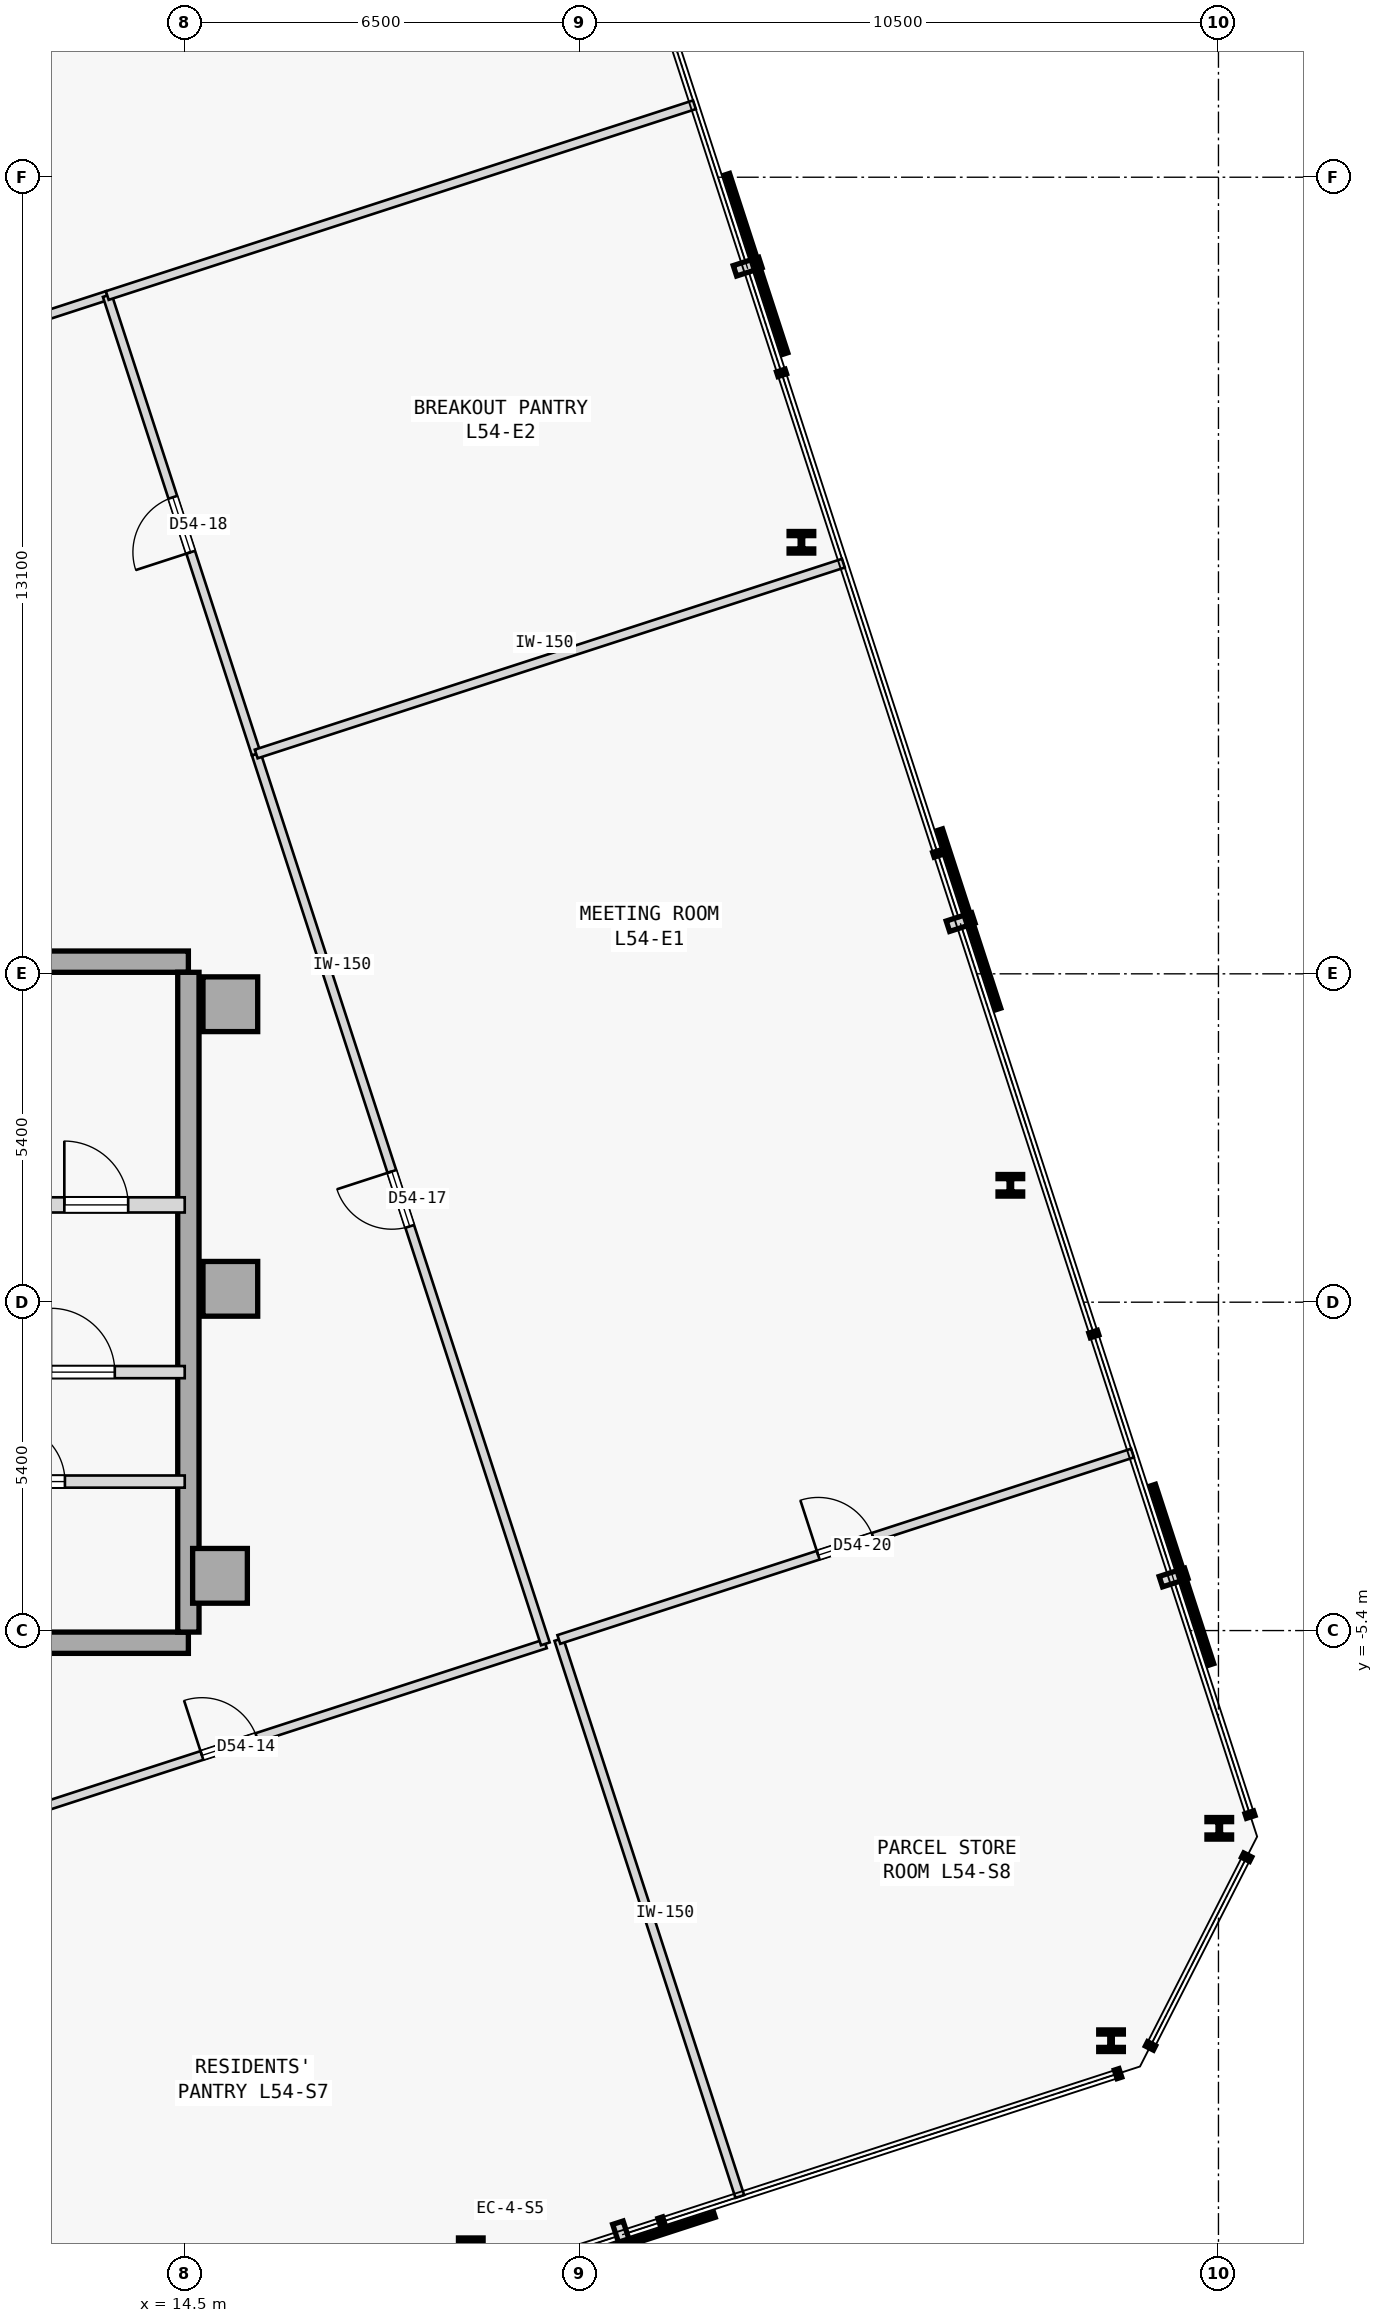
"""IFC4 building model, lengths in metres.
Left out: names, types, materials, properties, quantities, classifications, styles, units other than length and angle.
Written with IfcOpenShell. Run it as: python <this file> out.ifc"""

import sys

from ifc_helpers import new_model, si_unit, direction, frame, frame_2d, origin, origin_2d, place, context, subcontext, project, spatial, rectangle, i_section, extrude, element, fill, save


model = new_model("IFC4")
c1 = context("Model", 3, precision=1e-05, world=origin(), true_north=direction((0.0, 1.0)))
c2 = subcontext(c1, "Body", "Model", "MODEL_VIEW")
j1 = project(units=[si_unit("LENGTHUNIT", "METRE"), si_unit("PLANEANGLEUNIT", "RADIAN")], contexts=[c1])
p1 = place(None, origin())
s1 = spatial("IfcSite", under=j1, at=p1, CompositionType="ELEMENT")
p2 = place(p1, origin())
s2 = spatial("IfcBuilding", under=s1, at=p2, CompositionType="ELEMENT")
p3 = place(p2, frame((0.0, 0.0, 206.8)))
s3 = spatial("IfcBuildingStorey", under=s2, at=p3, CompositionType="ELEMENT", Elevation=206.8)
for number, where, z_axis, x_axis in (
    (1, (15.25, 4.9, 0.0), (0.0, 0.0, 1.0), (1.0, 0.0, 0.0)),
    (2, (15.25, 0.22, 0.0), (0.0, 0.0, 1.0), (1.0, 0.0, 0.0)),
    (3, (15.08, -4.5, 0.0), (0.0, 0.0, 1.0), (1.0, 0.0, 0.0)),
):
    element("IfcColumn", number, at=place(p3, frame(where, z_axis=z_axis, x_axis=x_axis)), inside=s3, PredefinedType="COLUMN", context=c2, shape_type="SweptSolid", body=[
        extrude(rectangle(XDim=0.9, YDim=0.9, at=origin_2d()), origin(), (0.0, 0.0, 1.0), 4.1),
    ])
p4 = place(p3, frame((3.15, 5.6, 0.0), z_axis=(0.0, 0.0, 1.0), x_axis=(1.0, 0.0, 0.0)))
e4 = element("IfcWall", 4, at=p4, inside=s3, PredefinedType="SHEAR", context=c2, shape_type="SweptSolid", body=[
    extrude(rectangle(XDim=11.41, YDim=0.35, at=frame_2d((5.705, 0.0))), origin(), (0.0, 0.0, 1.0), 3.875),
])
p5 = place(p3, frame((3.7, -5.6, 0.0), z_axis=(0.0, 0.0, 1.0), x_axis=(1.0, 0.0, 0.0)))
e5 = element("IfcWall", 5, at=p5, inside=s3, PredefinedType="SHEAR", context=c2, shape_type="SweptSolid", body=[
    extrude(rectangle(XDim=10.86, YDim=0.35, at=frame_2d((5.43, 0.0))), origin(), (0.0, 0.0, 1.0), 3.875),
])
p6 = place(p3, frame((14.56, -5.425, 0.0), z_axis=(0.0, 0.0, 1.0), x_axis=(0.0, 1.0, 0.0)))
e6 = element("IfcWall", 6, at=p6, inside=s3, PredefinedType="SHEAR", context=c2, shape_type="SweptSolid", body=[
    extrude(rectangle(XDim=10.85, YDim=0.35, at=frame_2d((5.425, 0.0))), origin(), (0.0, 0.0, 1.0), 3.875),
])
for number, where, z_axis, x_axis in (
    (7, (19.204, -15.566, 0.0), (0.0, 0.0, 1.0), (1.0, 0.0, 0.0)),
    (8, (29.734, -12.145, 0.0), (0.0, 0.0, 1.0), (1.0, 0.0, 0.0)),
    (9, (31.513, -8.652, 0.0), (0.0, 0.0, 1.0), (1.0, 0.0, 0.0)),
    (10, (28.078, 1.922, 0.0), (0.0, 0.0, 1.0), (1.0, 0.0, 0.0)),
    (11, (24.642, 12.497, 0.0), (0.0, 0.0, 1.0), (1.0, 0.0, 0.0)),
):
    element("IfcColumn", number, at=place(p3, frame(where, z_axis=z_axis, x_axis=x_axis)), inside=s3, PredefinedType="COLUMN", context=c2, shape_type="SweptSolid", body=[
        extrude(i_section(OverallWidth=0.405, OverallDepth=0.355, WebThickness=0.042, FlangeThickness=0.068, FilletRadius=0.015, at=origin_2d()), origin(), (0.0, 0.0, 1.0), 4.1),
    ])
p7 = place(p3, frame((10.9, 1.6, 0.0), z_axis=(0.0, 0.0, 1.0), x_axis=(1.0, 0.0, 0.0)))
e12 = element("IfcWall", 12, at=p7, inside=s3, PredefinedType="STANDARD", context=c2, shape_type="SweptSolid", body=[
    extrude(rectangle(XDim=3.6, YDim=0.25, at=frame_2d((1.8, 0.0))), origin(), (0.0, 0.0, 1.0), 3.875),
])
p8 = place(p7, frame((1.62, 0.0, 0.0)))
e13 = element("IfcOpeningElement", 13, at=p8, cuts=e12, PredefinedType="OPENING", context=c2, shape_type="SweptSolid", body=[
    extrude(rectangle(XDim=1.05, YDim=2.15, at=frame_2d((0.525, 1.075))), frame((0.0, 0.135, 0.0), z_axis=(0.0, -1.0, 0.0), x_axis=(1.0, 0.0, 0.0)), (0.0, 0.0, 1.0), 0.27),
])
p9 = place(p3, frame((11.55, -1.15, 0.0), z_axis=(0.0, 0.0, 1.0), x_axis=(1.0, 0.0, 0.0)))
e14 = element("IfcWall", 14, at=p9, inside=s3, PredefinedType="STANDARD", context=c2, shape_type="SweptSolid", body=[
    extrude(rectangle(XDim=2.95, YDim=0.2, at=frame_2d((1.475, 0.0))), origin(), (0.0, 0.0, 1.0), 3.875),
])
p10 = place(p9, frame((0.75, 0.0, 0.0)))
e15 = element("IfcOpeningElement", 15, at=p10, cuts=e14, PredefinedType="OPENING", context=c2, shape_type="SweptSolid", body=[
    extrude(rectangle(XDim=1.05, YDim=2.18, at=frame_2d((0.525, 1.09))), frame((0.0, 0.11, 0.0), z_axis=(0.0, -1.0, 0.0), x_axis=(1.0, 0.0, 0.0)), (0.0, 0.0, 1.0), 0.22),
])
p11 = place(p3, frame((3.7, -2.95, 0.0), z_axis=(0.0, 0.0, 1.0), x_axis=(1.0, 0.0, 0.0)))
e16 = element("IfcWall", 16, at=p11, inside=s3, PredefinedType="STANDARD", context=c2, shape_type="SweptSolid", body=[
    extrude(rectangle(XDim=10.8, YDim=0.2, at=frame_2d((5.4, 0.0))), origin(), (0.0, 0.0, 1.0), 3.875),
])
p12 = place(p11, frame((0.53, 0.0, 0.0)))
e17 = element("IfcOpeningElement", 17, at=p12, cuts=e16, PredefinedType="OPENING", context=c2, shape_type="SweptSolid", body=[
    extrude(rectangle(XDim=1.1, YDim=2.15, at=frame_2d((0.55, 1.075))), frame((0.0, 0.11, 0.0), z_axis=(0.0, -1.0, 0.0), x_axis=(1.0, 0.0, 0.0)), (0.0, 0.0, 1.0), 0.22),
])
p13 = place(p11, frame((2.69, 0.0, 0.0)))
e18 = element("IfcOpeningElement", 18, at=p13, cuts=e16, PredefinedType="OPENING", context=c2, shape_type="SweptSolid", body=[
    extrude(rectangle(XDim=1.1, YDim=2.15, at=frame_2d((0.55, 1.075))), frame((0.0, 0.11, 0.0), z_axis=(0.0, -1.0, 0.0), x_axis=(1.0, 0.0, 0.0)), (0.0, 0.0, 1.0), 0.22),
])
p14 = place(p11, frame((4.85, 0.0, 0.0)))
e19 = element("IfcOpeningElement", 19, at=p14, cuts=e16, PredefinedType="OPENING", context=c2, shape_type="SweptSolid", body=[
    extrude(rectangle(XDim=1.1, YDim=2.15, at=frame_2d((0.55, 1.075))), frame((0.0, 0.11, 0.0), z_axis=(0.0, -1.0, 0.0), x_axis=(1.0, 0.0, 0.0)), (0.0, 0.0, 1.0), 0.22),
])
p15 = place(p11, frame((7.88, 0.0, 0.0)))
e20 = element("IfcOpeningElement", 20, at=p15, cuts=e16, PredefinedType="OPENING", context=c2, shape_type="SweptSolid", body=[
    extrude(rectangle(XDim=0.95, YDim=2.15, at=frame_2d((0.475, 1.075))), frame((0.0, 0.11, 0.0), z_axis=(0.0, -1.0, 0.0), x_axis=(1.0, 0.0, 0.0)), (0.0, 0.0, 1.0), 0.22),
])
p16 = place(p3, frame((4.013, 13.561, 0.0), z_axis=(0.0, 0.0, 1.0), x_axis=(0.951057772929, 0.309013126826, 0.0)))
e21 = element("IfcWall", 21, at=p16, inside=s3, PredefinedType="PARTITIONING", context=c2, shape_type="SweptSolid", body=[
    extrude(rectangle(XDim=9.687, YDim=0.15, at=frame_2d((4.844, 0.0))), origin(), (0.0, 0.0, 1.0), 3.875),
])
p17 = place(p16, frame((4.368, 0.0, 0.0)))
e22 = element("IfcOpeningElement", 22, at=p17, cuts=e21, PredefinedType="OPENING", context=c2, shape_type="SweptSolid", body=[
    extrude(rectangle(XDim=0.95, YDim=2.15, at=frame_2d((0.475, 1.075))), frame((0.0, 0.085, 0.0), z_axis=(0.0, -1.0, 0.0), x_axis=(1.0, 0.0, 0.0)), (0.0, 0.0, 1.0), 0.17),
])
p18 = place(p3, frame((10.038, -8.995, 0.0), z_axis=(0.0, 0.0, 1.0), x_axis=(0.951055575401, 0.309019890135, 0.0)))
e23 = element("IfcWall", 23, at=p18, inside=s3, PredefinedType="PARTITIONING", context=c2, shape_type="SweptSolid", body=[
    extrude(rectangle(XDim=10.927, YDim=0.15, at=frame_2d((5.464, 0.0))), origin(), (0.0, 0.0, 1.0), 3.875),
])
p19 = place(p18, frame((4.989, 0.0, 0.0)))
e24 = element("IfcOpeningElement", 24, at=p19, cuts=e23, PredefinedType="OPENING", context=c2, shape_type="SweptSolid", body=[
    extrude(rectangle(XDim=0.95, YDim=2.15, at=frame_2d((0.475, 1.075))), frame((0.0, 0.085, 0.0), z_axis=(0.0, -1.0, 0.0), x_axis=(1.0, 0.0, 0.0)), (0.0, 0.0, 1.0), 0.17),
])
p20 = place(p3, frame((20.431, -5.618, 0.0), z_axis=(0.0, 0.0, 1.0), x_axis=(-0.309021492288, 0.951055054823, 0.0)))
e25 = element("IfcWall", 25, at=p20, inside=s3, PredefinedType="PARTITIONING", context=c2, shape_type="SweptSolid", body=[
    extrude(rectangle(XDim=15.387, YDim=0.15, at=frame_2d((7.693, 0.0))), origin(), (0.0, 0.0, 1.0), 3.875),
])
p21 = place(p20, frame((7.219, 0.0, 0.0)))
e26 = element("IfcOpeningElement", 26, at=p21, cuts=e25, PredefinedType="OPENING", context=c2, shape_type="SweptSolid", body=[
    extrude(rectangle(XDim=0.95, YDim=2.15, at=frame_2d((0.475, 1.075))), frame((0.0, 0.085, 0.0), z_axis=(0.0, -1.0, 0.0), x_axis=(1.0, 0.0, 0.0)), (0.0, 0.0, 1.0), 0.17),
])
p22 = place(p3, frame((15.676, 9.015, 0.0), z_axis=(0.0, 0.0, 1.0), x_axis=(-0.30903035975, 0.951052173518, 0.0)))
e27 = element("IfcWall", 27, at=p22, inside=s3, PredefinedType="PARTITIONING", context=c2, shape_type="SweptSolid", body=[
    extrude(rectangle(XDim=7.927, YDim=0.15, at=frame_2d((3.963, 0.0))), origin(), (0.0, 0.0, 1.0), 3.875),
])
p23 = place(p22, frame((3.489, 0.0, 0.0)))
e28 = element("IfcOpeningElement", 28, at=p23, cuts=e27, PredefinedType="OPENING", context=c2, shape_type="SweptSolid", body=[
    extrude(rectangle(XDim=0.95, YDim=2.15, at=frame_2d((0.475, 1.075))), frame((0.0, 0.085, 0.0), z_axis=(0.0, -1.0, 0.0), x_axis=(1.0, 0.0, 0.0)), (0.0, 0.0, 1.0), 0.17),
])
p24 = place(p3, frame((13.226, 16.554, 0.0), z_axis=(0.0, 0.0, 1.0), x_axis=(0.951055801856, 0.309019193185, 0.0)))
e29 = element("IfcWall", 29, at=p24, inside=s3, PredefinedType="PARTITIONING", context=c2, shape_type="SweptSolid", body=[
    extrude(rectangle(XDim=10.153, YDim=0.15, at=frame_2d((5.076, 0.0))), origin(), (0.0, 0.0, 1.0), 3.875),
])
for number, where, z_axis, x_axis in (
    (30, (13.015, -18.156, 0.0), (0.0, 0.0, 1.0), (-0.309, 0.951, 0.0)),
    (31, (23.629, -14.707, 0.0), (0.0, 0.0, 1.0), (-0.309, 0.951, 0.0)),
):
    element("IfcWall", number, at=place(p3, frame(where, z_axis=z_axis, x_axis=x_axis)), inside=s3, PredefinedType="PARTITIONING", context=c2, shape_type="SweptSolid", body=[
        extrude(rectangle(XDim=9.632, YDim=0.15, at=frame_2d((4.816, 0.0))), origin(), (0.0, 0.0, 1.0), 3.875),
    ])
p25 = place(p3, frame((20.652, -5.546, 0.0), z_axis=(0.0, 0.0, 1.0), x_axis=(0.951057939298, 0.309012614787, 0.0)))
e32 = element("IfcWall", 32, at=p25, inside=s3, PredefinedType="PARTITIONING", context=c2, shape_type="SweptSolid", body=[
    extrude(rectangle(XDim=9.92, YDim=0.15, at=frame_2d((4.96, 0.0))), origin(), (0.0, 0.0, 1.0), 3.875),
])
p26 = place(p25, frame((4.485, 0.0, 0.0)))
e33 = element("IfcOpeningElement", 33, at=p26, cuts=e32, PredefinedType="OPENING", context=c2, shape_type="SweptSolid", body=[
    extrude(rectangle(XDim=0.95, YDim=2.15, at=frame_2d((0.475, 1.075))), frame((0.0, 0.085, 0.0), z_axis=(0.0, -1.0, 0.0), x_axis=(1.0, 0.0, 0.0)), (0.0, 0.0, 1.0), 0.17),
])
p27 = place(p3, frame((15.676, 9.015, 0.0), z_axis=(0.0, 0.0, 1.0), x_axis=(0.951055801856, 0.309019193185, 0.0)))
e34 = element("IfcWall", 34, at=p27, inside=s3, PredefinedType="PARTITIONING", context=c2, shape_type="SweptSolid", body=[
    extrude(rectangle(XDim=10.153, YDim=0.15, at=frame_2d((5.076, 0.0))), origin(), (0.0, 0.0, 1.0), 3.875),
])
p28 = place(p8, origin())
e35 = element("IfcDoor", 35, at=p28, inside=s3, OperationType="SINGLE_SWING_LEFT", PredefinedType="DOOR", context=c2, shape_type="SweptSolid", body=[
    extrude(rectangle(XDim=1.05, YDim=2.15, at=frame_2d((0.525, 1.075))), frame((0.0, 0.025, 0.0), z_axis=(0.0, -1.0, 0.0), x_axis=(1.0, 0.0, 0.0)), (0.0, 0.0, 1.0), 0.05),
])
fill(e13, e35)
p29 = place(p10, origin())
e36 = element("IfcDoor", 36, at=p29, inside=s3, OperationType="SINGLE_SWING_LEFT", PredefinedType="DOOR", context=c2, shape_type="SweptSolid", body=[
    extrude(rectangle(XDim=1.05, YDim=2.18, at=frame_2d((0.525, 1.09))), frame((0.0, 0.025, 0.0), z_axis=(0.0, -1.0, 0.0), x_axis=(1.0, 0.0, 0.0)), (0.0, 0.0, 1.0), 0.05),
])
fill(e15, e36)
p30 = place(p15, origin())
e37 = element("IfcDoor", 37, at=p30, inside=s3, OperationType="SINGLE_SWING_LEFT", PredefinedType="DOOR", context=c2, shape_type="SweptSolid", body=[
    extrude(rectangle(XDim=0.95, YDim=2.15, at=frame_2d((0.475, 1.075))), frame((0.0, 0.025, 0.0), z_axis=(0.0, -1.0, 0.0), x_axis=(1.0, 0.0, 0.0)), (0.0, 0.0, 1.0), 0.05),
])
fill(e20, e37)
p31 = place(p19, origin())
e38 = element("IfcDoor", 38, at=p31, inside=s3, OperationType="SINGLE_SWING_LEFT", PredefinedType="DOOR", context=c2, shape_type="SweptSolid", body=[
    extrude(rectangle(XDim=0.95, YDim=2.15, at=frame_2d((0.475, 1.075))), frame((0.0, 0.025, 0.0), z_axis=(0.0, -1.0, 0.0), x_axis=(1.0, 0.0, 0.0)), (0.0, 0.0, 1.0), 0.05),
])
fill(e24, e38)
p32 = place(p21, origin())
e39 = element("IfcDoor", 39, at=p32, inside=s3, OperationType="SINGLE_SWING_RIGHT", PredefinedType="DOOR", context=c2, shape_type="SweptSolid", body=[
    extrude(rectangle(XDim=0.95, YDim=2.15, at=frame_2d((0.475, 1.075))), frame((0.0, 0.025, 0.0), z_axis=(0.0, -1.0, 0.0), x_axis=(1.0, 0.0, 0.0)), (0.0, 0.0, 1.0), 0.05),
])
fill(e26, e39)
p33 = place(p23, origin())
e40 = element("IfcDoor", 40, at=p33, inside=s3, OperationType="SINGLE_SWING_LEFT", PredefinedType="DOOR", context=c2, shape_type="SweptSolid", body=[
    extrude(rectangle(XDim=0.95, YDim=2.15, at=frame_2d((0.475, 1.075))), frame((0.0, 0.025, 0.0), z_axis=(0.0, -1.0, 0.0), x_axis=(1.0, 0.0, 0.0)), (0.0, 0.0, 1.0), 0.05),
])
fill(e28, e40)
p34 = place(p26, origin())
e41 = element("IfcDoor", 41, at=p34, inside=s3, OperationType="SINGLE_SWING_LEFT", PredefinedType="DOOR", context=c2, shape_type="SweptSolid", body=[
    extrude(rectangle(XDim=0.95, YDim=2.15, at=frame_2d((0.475, 1.075))), frame((0.0, 0.025, 0.0), z_axis=(0.0, -1.0, 0.0), x_axis=(1.0, 0.0, 0.0)), (0.0, 0.0, 1.0), 0.05),
])
fill(e33, e41)
save(model, sys.argv[1])
